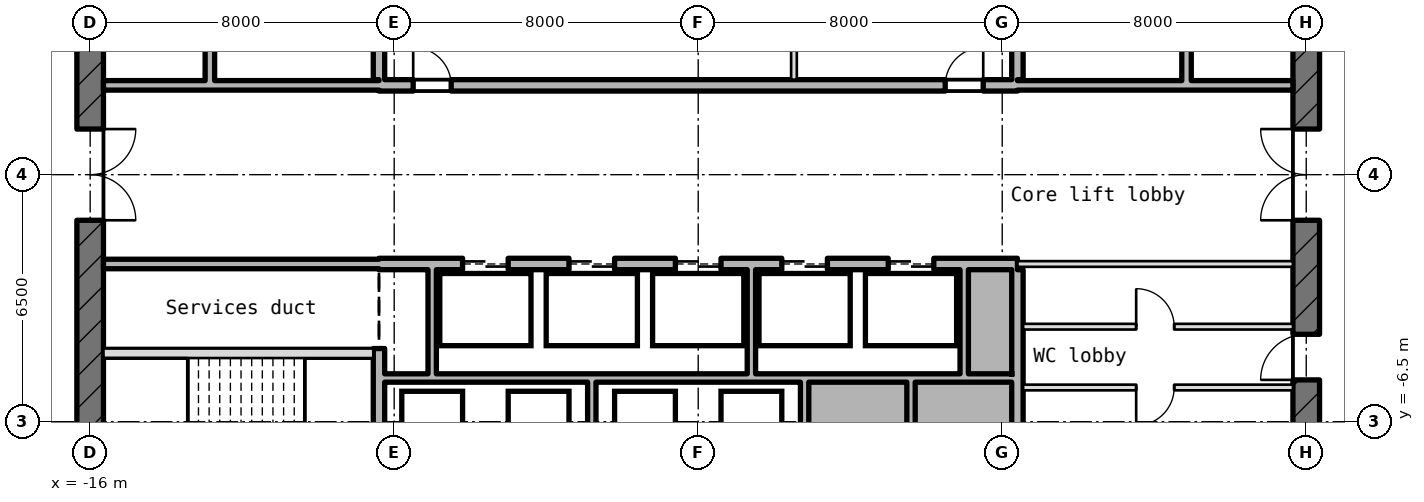
"""IFC4 building model, lengths in metres.
Left out: names, types, materials, properties, quantities, classifications, styles, units other than length and angle.
Written with IfcOpenShell. Run it as: python <this file> out.ifc"""

import sys

from ifc_helpers import new_model, si_unit, direction, frame, frame_2d, origin, place, context, subcontext, project, spatial, rectangle, extrude, element, fill, save


model = new_model("IFC4")
c1 = context("Model", 3, precision=1e-05, world=origin(), true_north=direction((0.0, 1.0)))
c2 = subcontext(c1, "Body", "Model", "MODEL_VIEW")
j1 = project(units=[si_unit("LENGTHUNIT", "METRE"), si_unit("PLANEANGLEUNIT", "RADIAN")], contexts=[c1])
p1 = place(None, origin())
s1 = spatial("IfcSite", under=j1, at=p1, CompositionType="ELEMENT")
p2 = place(p1, origin())
s2 = spatial("IfcBuilding", under=s1, at=p2, CompositionType="ELEMENT")
p3 = place(p2, frame((0.0, 0.0, 309.4)))
s3 = spatial("IfcBuildingStorey", under=s2, at=p3, CompositionType="ELEMENT", Elevation=309.4)
p4 = place(p3, frame((16.0, -10.145, -0.18), z_axis=(0.0, 0.0, 1.0), x_axis=(0.0, 1.0, 0.0)))
e1 = element("IfcWall", 1, at=p4, inside=s3, PredefinedType="SHEAR", context=c2, shape_type="SweptSolid", body=[
    extrude(rectangle(XDim=20.29, YDim=0.7, at=frame_2d((10.145, 0.0))), origin(), (0.0, 0.0, 1.0), 4.15),
])
p5 = place(p4, frame((8.945, 0.0, 0.18)))
e2 = element("IfcOpeningElement", 2, at=p5, cuts=e1, PredefinedType="OPENING", context=c2, shape_type="SweptSolid", body=[
    extrude(rectangle(XDim=2.4, YDim=2.1, at=frame_2d((1.2, 1.05))), frame((0.0, 0.36, 0.0), z_axis=(0.0, -1.0, 0.0), x_axis=(1.0, 0.0, 0.0)), (0.0, 0.0, 1.0), 0.72),
])
p6 = place(p4, frame((13.545, 0.0, 0.18)))
e3 = element("IfcOpeningElement", 3, at=p6, cuts=e1, PredefinedType="OPENING", context=c2, shape_type="SweptSolid", body=[
    extrude(rectangle(XDim=1.2, YDim=2.1, at=frame_2d((0.6, 1.05))), frame((0.0, 0.36, 0.0), z_axis=(0.0, -1.0, 0.0), x_axis=(1.0, 0.0, 0.0)), (0.0, 0.0, 1.0), 0.72),
])
p7 = place(p4, frame((4.745, 0.0, 0.18)))
e4 = element("IfcOpeningElement", 4, at=p7, cuts=e1, PredefinedType="OPENING", context=c2, shape_type="SweptSolid", body=[
    extrude(rectangle(XDim=1.2, YDim=2.1, at=frame_2d((0.6, 1.05))), frame((0.0, 0.36, 0.0), z_axis=(0.0, -1.0, 0.0), x_axis=(1.0, 0.0, 0.0)), (0.0, 0.0, 1.0), 0.72),
])
p8 = place(p3, frame((-16.0, 10.145, -0.18), z_axis=(0.0, 0.0, 1.0), x_axis=(0.0, -1.0, 0.0)))
e5 = element("IfcWall", 5, at=p8, inside=s3, PredefinedType="SHEAR", context=c2, shape_type="SweptSolid", body=[
    extrude(rectangle(XDim=20.29, YDim=0.7, at=frame_2d((10.145, 0.0))), origin(), (0.0, 0.0, 1.0), 4.15),
])
p9 = place(p8, frame((8.945, 0.0, 0.18)))
e6 = element("IfcOpeningElement", 6, at=p9, cuts=e5, PredefinedType="OPENING", context=c2, shape_type="SweptSolid", body=[
    extrude(rectangle(XDim=2.4, YDim=2.1, at=frame_2d((1.2, 1.05))), frame((0.0, 0.36, 0.0), z_axis=(0.0, -1.0, 0.0), x_axis=(1.0, 0.0, 0.0)), (0.0, 0.0, 1.0), 0.72),
])
p10 = place(p8, frame((5.545, 0.0, 0.18)))
e7 = element("IfcOpeningElement", 7, at=p10, cuts=e5, PredefinedType="OPENING", context=c2, shape_type="SweptSolid", body=[
    extrude(rectangle(XDim=1.2, YDim=2.1, at=frame_2d((0.6, 1.05))), frame((0.0, 0.36, 0.0), z_axis=(0.0, -1.0, 0.0), x_axis=(1.0, 0.0, 0.0)), (0.0, 0.0, 1.0), 0.72),
])
p11 = place(p3, frame((8.55, -5.6, 0.0), z_axis=(0.0, 0.0, 1.0), x_axis=(1.0, 0.0, 0.0)))
e8 = element("IfcWall", 8, at=p11, inside=s3, PredefinedType="PARTITIONING", context=c2, shape_type="SweptSolid", body=[
    extrude(rectangle(XDim=7.1, YDim=0.15, at=frame_2d((3.55, 0.0))), origin(), (0.0, 0.0, 1.0), 3.97),
])
p12 = place(p11, frame((2.975, 0.0, 0.0)))
e9 = element("IfcOpeningElement", 9, at=p12, cuts=e8, PredefinedType="OPENING", context=c2, shape_type="SweptSolid", body=[
    extrude(rectangle(XDim=1.0, YDim=2.1, at=frame_2d((0.5, 1.05))), frame((0.0, 0.085, 0.0), z_axis=(0.0, -1.0, 0.0), x_axis=(1.0, 0.0, 0.0)), (0.0, 0.0, 1.0), 0.17),
])
p13 = place(p3, frame((-8.25, -5.35, 0.0), z_axis=(0.0, 0.0, 1.0), x_axis=(1.0, 0.0, 0.0)))
e10 = element("IfcWall", 10, at=p13, inside=s3, PredefinedType="STANDARD", context=c2, shape_type="SweptSolid", body=[
    extrude(rectangle(XDim=16.5, YDim=0.22, at=frame_2d((8.25, 0.0))), origin(), (0.0, 0.0, 1.0), 3.97),
])
p14 = place(p3, frame((-15.65, -4.7, -0.18), z_axis=(0.0, 0.0, 1.0), x_axis=(1.0, 0.0, 0.0)))
e11 = element("IfcWall", 11, at=p14, inside=s3, PredefinedType="SHEAR", context=c2, shape_type="SweptSolid", body=[
    extrude(rectangle(XDim=7.1, YDim=0.25, at=frame_2d((3.55, 0.0))), origin(), (0.0, 0.0, 1.0), 4.15),
])
p15 = place(p3, frame((8.55, -4.0, 0.0), z_axis=(0.0, 0.0, 1.0), x_axis=(1.0, 0.0, 0.0)))
e12 = element("IfcWall", 12, at=p15, inside=s3, PredefinedType="PARTITIONING", context=c2, shape_type="SweptSolid", body=[
    extrude(rectangle(XDim=7.1, YDim=0.15, at=frame_2d((3.55, 0.0))), origin(), (0.0, 0.0, 1.0), 3.97),
])
p16 = place(p15, frame((2.975, 0.0, 0.0)))
e13 = element("IfcOpeningElement", 13, at=p16, cuts=e12, PredefinedType="OPENING", context=c2, shape_type="SweptSolid", body=[
    extrude(rectangle(XDim=1.0, YDim=2.1, at=frame_2d((0.5, 1.05))), frame((0.0, 0.085, 0.0), z_axis=(0.0, -1.0, 0.0), x_axis=(1.0, 0.0, 0.0)), (0.0, 0.0, 1.0), 0.17),
])
p17 = place(p3, frame((-15.65, -2.35, 0.0), z_axis=(0.0, 0.0, 1.0), x_axis=(1.0, 0.0, 0.0)))
e14 = element("IfcWall", 14, at=p17, inside=s3, PredefinedType="STANDARD", context=c2, shape_type="SweptSolid", body=[
    extrude(rectangle(XDim=7.25, YDim=0.25, at=frame_2d((3.625, 0.0))), origin(), (0.0, 0.0, 1.0), 3.97),
])
p18 = place(p3, frame((-8.4, -2.35, -0.18), z_axis=(0.0, 0.0, 1.0), x_axis=(1.0, 0.0, 0.0)))
e15 = element("IfcWall", 15, at=p18, inside=s3, PredefinedType="SHEAR", context=c2, shape_type="SweptSolid", body=[
    extrude(rectangle(XDim=16.8, YDim=0.3, at=frame_2d((8.4, 0.0))), origin(), (0.0, 0.0, 1.0), 4.15),
])
p19 = place(p18, frame((2.2, 0.0, 0.18)))
e16 = element("IfcOpeningElement", 16, at=p19, cuts=e15, PredefinedType="OPENING", context=c2, shape_type="SweptSolid", body=[
    extrude(rectangle(XDim=1.2, YDim=2.1, at=frame_2d((0.6, 1.05))), frame((0.0, 0.16, 0.0), z_axis=(0.0, -1.0, 0.0), x_axis=(1.0, 0.0, 0.0)), (0.0, 0.0, 1.0), 0.32),
])
p20 = place(p18, frame((5.0, 0.0, 0.18)))
e17 = element("IfcOpeningElement", 17, at=p20, cuts=e15, PredefinedType="OPENING", context=c2, shape_type="SweptSolid", body=[
    extrude(rectangle(XDim=1.2, YDim=2.1, at=frame_2d((0.6, 1.05))), frame((0.0, 0.16, 0.0), z_axis=(0.0, -1.0, 0.0), x_axis=(1.0, 0.0, 0.0)), (0.0, 0.0, 1.0), 0.32),
])
p21 = place(p18, frame((7.8, 0.0, 0.18)))
e18 = element("IfcOpeningElement", 18, at=p21, cuts=e15, PredefinedType="OPENING", context=c2, shape_type="SweptSolid", body=[
    extrude(rectangle(XDim=1.2, YDim=2.1, at=frame_2d((0.6, 1.05))), frame((0.0, 0.16, 0.0), z_axis=(0.0, -1.0, 0.0), x_axis=(1.0, 0.0, 0.0)), (0.0, 0.0, 1.0), 0.32),
])
p22 = place(p18, frame((10.6, 0.0, 0.18)))
e19 = element("IfcOpeningElement", 19, at=p22, cuts=e15, PredefinedType="OPENING", context=c2, shape_type="SweptSolid", body=[
    extrude(rectangle(XDim=1.2, YDim=2.1, at=frame_2d((0.6, 1.05))), frame((0.0, 0.16, 0.0), z_axis=(0.0, -1.0, 0.0), x_axis=(1.0, 0.0, 0.0)), (0.0, 0.0, 1.0), 0.32),
])
p23 = place(p18, frame((13.4, 0.0, 0.18)))
e20 = element("IfcOpeningElement", 20, at=p23, cuts=e15, PredefinedType="OPENING", context=c2, shape_type="SweptSolid", body=[
    extrude(rectangle(XDim=1.2, YDim=2.1, at=frame_2d((0.6, 1.05))), frame((0.0, 0.16, 0.0), z_axis=(0.0, -1.0, 0.0), x_axis=(1.0, 0.0, 0.0)), (0.0, 0.0, 1.0), 0.32),
])
p24 = place(p3, frame((8.4, -2.35, 0.0), z_axis=(0.0, 0.0, 1.0), x_axis=(1.0, 0.0, 0.0)))
e21 = element("IfcWall", 21, at=p24, inside=s3, PredefinedType="PARTITIONING", context=c2, shape_type="SweptSolid", body=[
    extrude(rectangle(XDim=7.25, YDim=0.15, at=frame_2d((3.625, 0.0))), origin(), (0.0, 0.0, 1.0), 3.97),
])
p25 = place(p3, frame((-15.65, 2.35, 0.0), z_axis=(0.0, 0.0, 1.0), x_axis=(1.0, 0.0, 0.0)))
e22 = element("IfcWall", 22, at=p25, inside=s3, PredefinedType="STANDARD", context=c2, shape_type="SweptSolid", body=[
    extrude(rectangle(XDim=7.25, YDim=0.25, at=frame_2d((3.625, 0.0))), origin(), (0.0, 0.0, 1.0), 3.97),
])
p26 = place(p3, frame((-8.4, 2.35, -0.18), z_axis=(0.0, 0.0, 1.0), x_axis=(1.0, 0.0, 0.0)))
e23 = element("IfcWall", 23, at=p26, inside=s3, PredefinedType="SHEAR", context=c2, shape_type="SweptSolid", body=[
    extrude(rectangle(XDim=16.8, YDim=0.3, at=frame_2d((8.4, 0.0))), origin(), (0.0, 0.0, 1.0), 4.15),
])
p27 = place(p26, frame((0.9, 0.0, 0.18)))
e24 = element("IfcOpeningElement", 24, at=p27, cuts=e23, PredefinedType="OPENING", context=c2, shape_type="SweptSolid", body=[
    extrude(rectangle(XDim=1.0, YDim=2.1, at=frame_2d((0.5, 1.05))), frame((0.0, 0.16, 0.0), z_axis=(0.0, -1.0, 0.0), x_axis=(1.0, 0.0, 0.0)), (0.0, 0.0, 1.0), 0.32),
])
p28 = place(p26, frame((14.9, 0.0, 0.18)))
e25 = element("IfcOpeningElement", 25, at=p28, cuts=e23, PredefinedType="OPENING", context=c2, shape_type="SweptSolid", body=[
    extrude(rectangle(XDim=1.0, YDim=2.1, at=frame_2d((0.5, 1.05))), frame((0.0, 0.16, 0.0), z_axis=(0.0, -1.0, 0.0), x_axis=(1.0, 0.0, 0.0)), (0.0, 0.0, 1.0), 0.32),
])
p29 = place(p3, frame((8.4, 2.35, 0.0), z_axis=(0.0, 0.0, 1.0), x_axis=(1.0, 0.0, 0.0)))
e26 = element("IfcWall", 26, at=p29, inside=s3, PredefinedType="STANDARD", context=c2, shape_type="SweptSolid", body=[
    extrude(rectangle(XDim=7.25, YDim=0.25, at=frame_2d((3.625, 0.0))), origin(), (0.0, 0.0, 1.0), 3.97),
])
p30 = place(p3, frame((-12.85, 2.475, 0.0), z_axis=(0.0, 0.0, 1.0), x_axis=(0.0, 1.0, 0.0)))
e27 = element("IfcWall", 27, at=p30, inside=s3, PredefinedType="STANDARD", context=c2, shape_type="SweptSolid", body=[
    extrude(rectangle(XDim=3.05, YDim=0.25, at=frame_2d((1.525, 0.0))), origin(), (0.0, 0.0, 1.0), 3.97),
])
p31 = place(p3, frame((-8.4, -8.75, -0.18), z_axis=(0.0, 0.0, 1.0), x_axis=(0.0, 1.0, 0.0)))
e28 = element("IfcWall", 28, at=p31, inside=s3, PredefinedType="SHEAR", context=c2, shape_type="SweptSolid", body=[
    extrude(rectangle(XDim=4.175, YDim=0.3, at=frame_2d((2.087, 0.0))), origin(), (0.0, 0.0, 1.0), 4.15),
])
p32 = place(p3, frame((-8.4, 2.5, -0.18), z_axis=(0.0, 0.0, 1.0), x_axis=(0.0, 1.0, 0.0)))
e29 = element("IfcWall", 29, at=p32, inside=s3, PredefinedType="SHEAR", context=c2, shape_type="SweptSolid", body=[
    extrude(rectangle(XDim=5.85, YDim=0.3, at=frame_2d((2.925, 0.0))), origin(), (0.0, 0.0, 1.0), 4.15),
])
p33 = place(p3, frame((-7.0, -5.24, 0.0), z_axis=(0.0, 0.0, 1.0), x_axis=(0.0, 1.0, 0.0)))
e30 = element("IfcWall", 30, at=p33, inside=s3, PredefinedType="STANDARD", context=c2, shape_type="SweptSolid", body=[
    extrude(rectangle(XDim=2.74, YDim=0.22, at=frame_2d((1.37, 0.0))), origin(), (0.0, 0.0, 1.0), 3.97),
])
p34 = place(p3, frame((-2.8, -8.35, 0.0), z_axis=(0.0, 0.0, 1.0), x_axis=(0.0, 1.0, 0.0)))
e31 = element("IfcWall", 31, at=p34, inside=s3, PredefinedType="STANDARD", context=c2, shape_type="SweptSolid", body=[
    extrude(rectangle(XDim=2.89, YDim=0.22, at=frame_2d((1.445, 0.0))), origin(), (0.0, 0.0, 1.0), 3.97),
])
p35 = place(p3, frame((1.4, -5.24, 0.0), z_axis=(0.0, 0.0, 1.0), x_axis=(0.0, 1.0, 0.0)))
e32 = element("IfcWall", 32, at=p35, inside=s3, PredefinedType="STANDARD", context=c2, shape_type="SweptSolid", body=[
    extrude(rectangle(XDim=2.74, YDim=0.22, at=frame_2d((1.37, 0.0))), origin(), (0.0, 0.0, 1.0), 3.97),
])
p36 = place(p3, frame((2.52, 2.5, 0.0), z_axis=(0.0, 0.0, 1.0), x_axis=(0.0, 1.0, 0.0)))
e33 = element("IfcWall", 33, at=p36, inside=s3, PredefinedType="PARTITIONING", context=c2, shape_type="SweptSolid", body=[
    extrude(rectangle(XDim=2.775, YDim=0.15, at=frame_2d((1.387, 0.0))), origin(), (0.0, 0.0, 1.0), 3.97),
])
for number, where, z_axis, x_axis in (
    (34, (2.8, -8.24, 0.0), (0.0, 0.0, 1.0), (0.0, 1.0, 0.0)),
    (35, (5.6, -8.24, 0.0), (0.0, 0.0, 1.0), (0.0, 1.0, 0.0)),
):
    element("IfcWall", number, at=place(p3, frame(where, z_axis=z_axis, x_axis=x_axis)), inside=s3, PredefinedType="STANDARD", context=c2, shape_type="SweptSolid", body=[
        extrude(rectangle(XDim=2.78, YDim=0.22, at=frame_2d((1.39, 0.0))), origin(), (0.0, 0.0, 1.0), 3.97),
    ])
p37 = place(p3, frame((7.0, -5.24, 0.0), z_axis=(0.0, 0.0, 1.0), x_axis=(0.0, 1.0, 0.0)))
e36 = element("IfcWall", 36, at=p37, inside=s3, PredefinedType="STANDARD", context=c2, shape_type="SweptSolid", body=[
    extrude(rectangle(XDim=2.74, YDim=0.22, at=frame_2d((1.37, 0.0))), origin(), (0.0, 0.0, 1.0), 3.97),
])
for number, where, z_axis, x_axis in (
    (37, (8.4, -8.35, -0.18), (0.0, 0.0, 1.0), (0.0, 1.0, 0.0)),
    (38, (8.4, 2.5, -0.18), (0.0, 0.0, 1.0), (0.0, 1.0, 0.0)),
):
    element("IfcWall", number, at=place(p3, frame(where, z_axis=z_axis, x_axis=x_axis)), inside=s3, PredefinedType="SHEAR", context=c2, shape_type="SweptSolid", body=[
        extrude(rectangle(XDim=5.85, YDim=0.3, at=frame_2d((2.925, 0.0))), origin(), (0.0, 0.0, 1.0), 4.15),
    ])
p38 = place(p3, frame((12.85, 2.475, 0.0), z_axis=(0.0, 0.0, 1.0), x_axis=(0.0, 1.0, 0.0)))
e39 = element("IfcWall", 39, at=p38, inside=s3, PredefinedType="STANDARD", context=c2, shape_type="SweptSolid", body=[
    extrude(rectangle(XDim=3.05, YDim=0.25, at=frame_2d((1.525, 0.0))), origin(), (0.0, 0.0, 1.0), 3.97),
])
p39 = place(p19, origin())
e40 = element("IfcDoor", 40, at=p39, inside=s3, OperationType="DOUBLE_DOOR_SLIDING", PredefinedType="DOOR", context=c2, shape_type="SweptSolid", body=[
    extrude(rectangle(XDim=1.2, YDim=2.1, at=frame_2d((0.6, 1.05))), frame((0.0, 0.025, 0.0), z_axis=(0.0, -1.0, 0.0), x_axis=(1.0, 0.0, 0.0)), (0.0, 0.0, 1.0), 0.05),
])
fill(e16, e40)
p40 = place(p20, origin())
e41 = element("IfcDoor", 41, at=p40, inside=s3, OperationType="DOUBLE_DOOR_SLIDING", PredefinedType="DOOR", context=c2, shape_type="SweptSolid", body=[
    extrude(rectangle(XDim=1.2, YDim=2.1, at=frame_2d((0.6, 1.05))), frame((0.0, 0.025, 0.0), z_axis=(0.0, -1.0, 0.0), x_axis=(1.0, 0.0, 0.0)), (0.0, 0.0, 1.0), 0.05),
])
fill(e17, e41)
p41 = place(p21, origin())
e42 = element("IfcDoor", 42, at=p41, inside=s3, OperationType="DOUBLE_DOOR_SLIDING", PredefinedType="DOOR", context=c2, shape_type="SweptSolid", body=[
    extrude(rectangle(XDim=1.2, YDim=2.1, at=frame_2d((0.6, 1.05))), frame((0.0, 0.025, 0.0), z_axis=(0.0, -1.0, 0.0), x_axis=(1.0, 0.0, 0.0)), (0.0, 0.0, 1.0), 0.05),
])
fill(e18, e42)
p42 = place(p22, origin())
e43 = element("IfcDoor", 43, at=p42, inside=s3, OperationType="DOUBLE_DOOR_SLIDING", PredefinedType="DOOR", context=c2, shape_type="SweptSolid", body=[
    extrude(rectangle(XDim=1.2, YDim=2.1, at=frame_2d((0.6, 1.05))), frame((0.0, 0.025, 0.0), z_axis=(0.0, -1.0, 0.0), x_axis=(1.0, 0.0, 0.0)), (0.0, 0.0, 1.0), 0.05),
])
fill(e19, e43)
p43 = place(p23, origin())
e44 = element("IfcDoor", 44, at=p43, inside=s3, OperationType="DOUBLE_DOOR_SLIDING", PredefinedType="DOOR", context=c2, shape_type="SweptSolid", body=[
    extrude(rectangle(XDim=1.2, YDim=2.1, at=frame_2d((0.6, 1.05))), frame((0.0, 0.025, 0.0), z_axis=(0.0, -1.0, 0.0), x_axis=(1.0, 0.0, 0.0)), (0.0, 0.0, 1.0), 0.05),
])
fill(e20, e44)
p44 = place(p9, origin())
e45 = element("IfcDoor", 45, at=p44, inside=s3, OperationType="DOUBLE_DOOR_SINGLE_SWING", PredefinedType="DOOR", context=c2, shape_type="SweptSolid", body=[
    extrude(rectangle(XDim=2.4, YDim=2.1, at=frame_2d((1.2, 1.05))), frame((0.0, 0.025, 0.0), z_axis=(0.0, -1.0, 0.0), x_axis=(1.0, 0.0, 0.0)), (0.0, 0.0, 1.0), 0.05),
])
fill(e6, e45)
p45 = place(p5, origin())
e46 = element("IfcDoor", 46, at=p45, inside=s3, OperationType="DOUBLE_DOOR_SINGLE_SWING", PredefinedType="DOOR", context=c2, shape_type="SweptSolid", body=[
    extrude(rectangle(XDim=2.4, YDim=2.1, at=frame_2d((1.2, 1.05))), frame((0.0, 0.025, 0.0), z_axis=(0.0, -1.0, 0.0), x_axis=(1.0, 0.0, 0.0)), (0.0, 0.0, 1.0), 0.05),
])
fill(e2, e46)
p46 = place(p27, origin())
e47 = element("IfcDoor", 47, at=p46, inside=s3, OperationType="SINGLE_SWING_RIGHT", PredefinedType="DOOR", context=c2, shape_type="SweptSolid", body=[
    extrude(rectangle(XDim=1.0, YDim=2.1, at=frame_2d((0.5, 1.05))), frame((0.0, 0.025, 0.0), z_axis=(0.0, -1.0, 0.0), x_axis=(1.0, 0.0, 0.0)), (0.0, 0.0, 1.0), 0.05),
])
fill(e24, e47)
p47 = place(p28, origin())
e48 = element("IfcDoor", 48, at=p47, inside=s3, OperationType="SINGLE_SWING_RIGHT", PredefinedType="DOOR", context=c2, shape_type="SweptSolid", body=[
    extrude(rectangle(XDim=1.0, YDim=2.1, at=frame_2d((0.5, 1.05))), frame((0.0, 0.025, 0.0), z_axis=(0.0, -1.0, 0.0), x_axis=(1.0, 0.0, 0.0)), (0.0, 0.0, 1.0), 0.05),
])
fill(e25, e48)
p48 = place(p16, origin())
e49 = element("IfcDoor", 49, at=p48, inside=s3, OperationType="SINGLE_SWING_RIGHT", PredefinedType="DOOR", context=c2, shape_type="SweptSolid", body=[
    extrude(rectangle(XDim=1.0, YDim=2.1, at=frame_2d((0.5, 1.05))), frame((0.0, 0.025, 0.0), z_axis=(0.0, -1.0, 0.0), x_axis=(1.0, 0.0, 0.0)), (0.0, 0.0, 1.0), 0.05),
])
fill(e13, e49)
p49 = place(p7, origin())
e50 = element("IfcDoor", 50, at=p49, inside=s3, OperationType="SINGLE_SWING_RIGHT", PredefinedType="DOOR", context=c2, shape_type="SweptSolid", body=[
    extrude(rectangle(XDim=1.2, YDim=2.1, at=frame_2d((0.6, 1.05))), frame((0.0, 0.025, 0.0), z_axis=(0.0, -1.0, 0.0), x_axis=(1.0, 0.0, 0.0)), (0.0, 0.0, 1.0), 0.05),
])
fill(e4, e50)
p50 = place(p12, frame((1.0, 0.0, 0.0), z_axis=(0.0, 0.0, 1.0), x_axis=(-1.0, 0.0, 0.0)))
e51 = element("IfcDoor", 51, at=p50, inside=s3, OperationType="SINGLE_SWING_LEFT", PredefinedType="DOOR", context=c2, shape_type="SweptSolid", body=[
    extrude(rectangle(XDim=1.0, YDim=2.1, at=frame_2d((0.5, 1.05))), frame((0.0, 0.025, 0.0), z_axis=(0.0, -1.0, 0.0), x_axis=(1.0, 0.0, 0.0)), (0.0, 0.0, 1.0), 0.05),
])
fill(e9, e51)
save(model, sys.argv[1])
